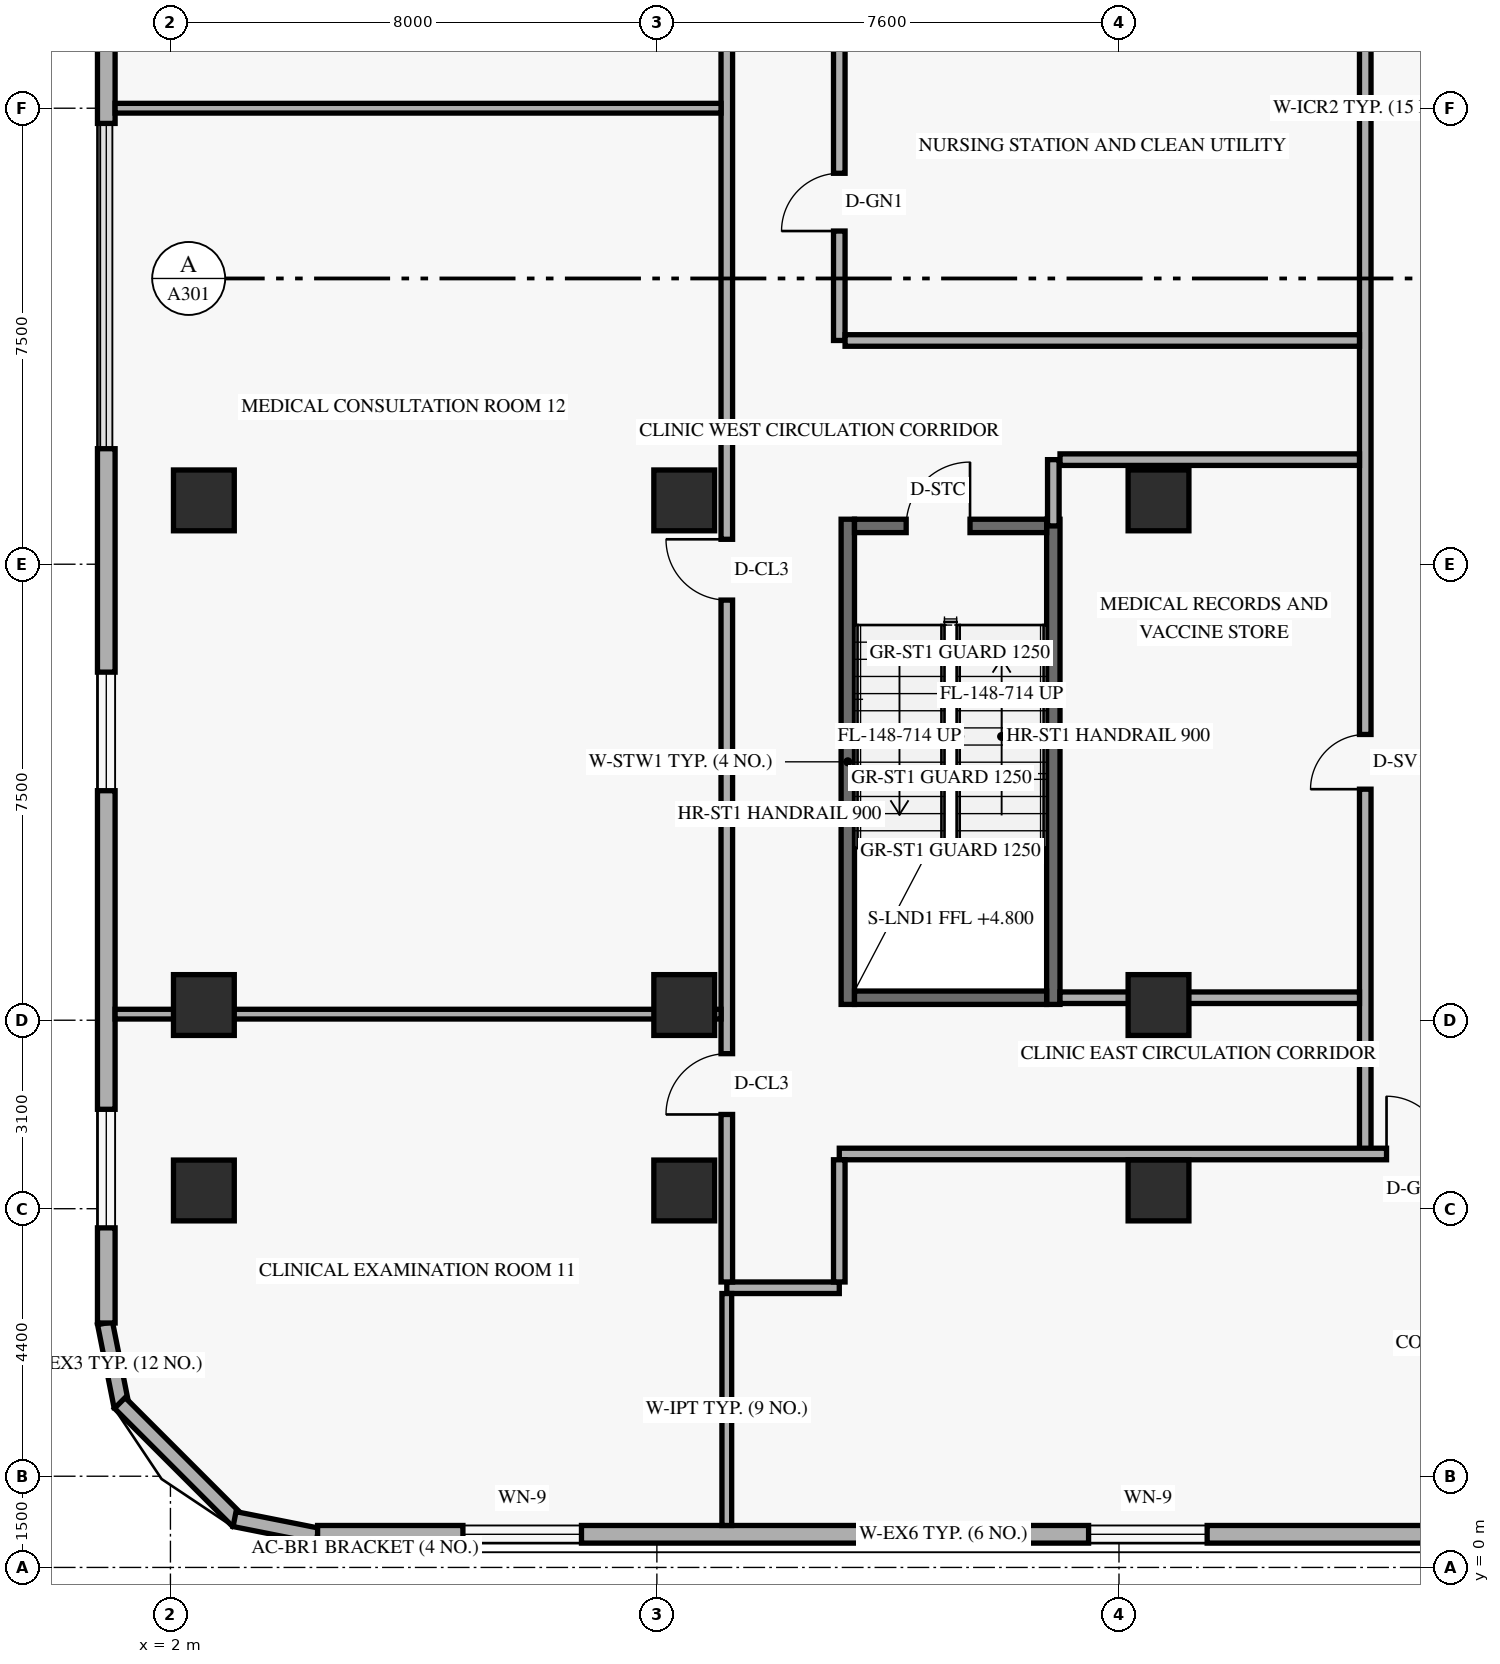
"""IFC4 building model, lengths in metres.
Left out: names, types, materials, properties, quantities, classifications, styles, units other than length and angle.
Written with IfcOpenShell. Run it as: python <this file> out.ifc"""

import sys

from ifc_helpers import new_model, si_unit, direction, frame, frame_2d, origin, origin_2d, place, context, subcontext, project, spatial, rectangle, extrude, element, fill, save


model = new_model("IFC4")
c1 = context("Model", 3, precision=1e-05, world=origin(), true_north=direction((0.0, 1.0)))
c2 = subcontext(c1, "Body", "Model", "MODEL_VIEW")
j1 = project(units=[si_unit("LENGTHUNIT", "METRE"), si_unit("PLANEANGLEUNIT", "RADIAN")], contexts=[c1])
p1 = place(None, origin())
s1 = spatial("IfcSite", under=j1, at=p1, CompositionType="ELEMENT")
p2 = place(p1, origin())
s2 = spatial("IfcBuilding", under=s1, at=p2, CompositionType="ELEMENT")
p3 = place(p2, frame((0.0, 0.0, 4.8)))
s3 = spatial("IfcBuildingStorey", under=s2, at=p3, CompositionType="ELEMENT", Elevation=4.8)
for number, where, z_axis, x_axis in (
    (1, (13.14, 9.26, 0.0), (0.0, 0.0, 1.0), (0.0, 1.0, 0.0)),
    (2, (16.52, 9.26, 0.0), (0.0, 0.0, 1.0), (0.0, 1.0, 0.0)),
):
    element("IfcWall", number, at=place(p3, frame(where, z_axis=z_axis, x_axis=x_axis)), inside=s3, PredefinedType="SHEAR", context=c2, shape_type="SweptSolid", body=[
        extrude(rectangle(XDim=7.98, YDim=0.22, at=frame_2d((3.99, 0.0))), origin(), (0.0, 0.0, 1.0), 4.52),
    ])
p4 = place(p3, frame((13.25, 9.37, 0.0), z_axis=(0.0, 0.0, 1.0), x_axis=(1.0, 0.0, 0.0)))
e3 = element("IfcWall", 3, at=p4, inside=s3, PredefinedType="SHEAR", context=c2, shape_type="SweptSolid", body=[
    extrude(rectangle(XDim=3.16, YDim=0.22, at=frame_2d((1.58, 0.0))), origin(), (0.0, 0.0, 1.0), 4.52),
])
p5 = place(p3, frame((13.25, 17.13, 0.0), z_axis=(0.0, 0.0, 1.0), x_axis=(1.0, 0.0, 0.0)))
e4 = element("IfcWall", 4, at=p5, inside=s3, PredefinedType="SHEAR", context=c2, shape_type="SweptSolid", body=[
    extrude(rectangle(XDim=3.16, YDim=0.22, at=frame_2d((1.58, 0.0))), origin(), (0.0, 0.0, 1.0), 4.52),
])
p6 = place(p5, frame((0.85, 0.0, 0.0)))
e5 = element("IfcOpeningElement", 5, at=p6, cuts=e4, PredefinedType="OPENING", context=c2, shape_type="SweptSolid", body=[
    extrude(rectangle(XDim=1.05, YDim=2.15, at=frame_2d((0.525, 1.075))), frame((0.0, 0.12, 0.0), z_axis=(0.0, -1.0, 0.0), x_axis=(1.0, 0.0, 0.0)), (0.0, 0.0, 1.0), 0.24),
])
for number, where, z_axis, x_axis in (
    (6, (2.55, 6.2, 0.0), (0.0, 0.0, 1.0), (1.0, 0.0, 0.0)),
    (7, (2.55, 9.25, 0.0), (0.0, 0.0, 1.0), (1.0, 0.0, 0.0)),
    (8, (2.55, 17.55, 0.0), (0.0, 0.0, 1.0), (1.0, 0.0, 0.0)),
    (9, (10.45, 6.2, 0.0), (0.0, 0.0, 1.0), (1.0, 0.0, 0.0)),
    (10, (10.45, 9.25, 0.0), (0.0, 0.0, 1.0), (1.0, 0.0, 0.0)),
    (11, (10.45, 17.55, 0.0), (0.0, 0.0, 1.0), (1.0, 0.0, 0.0)),
    (12, (18.25, 6.2, 0.0), (0.0, 0.0, 1.0), (1.0, 0.0, 0.0)),
    (13, (18.25, 9.25, 0.0), (0.0, 0.0, 1.0), (1.0, 0.0, 0.0)),
    (14, (18.25, 17.55, 0.0), (0.0, 0.0, 1.0), (1.0, 0.0, 0.0)),
):
    element("IfcColumn", number, at=place(p3, frame(where, z_axis=z_axis, x_axis=x_axis)), inside=s3, PredefinedType="COLUMN", context=c2, shape_type="SweptSolid", body=[
        extrude(rectangle(XDim=1.0, YDim=1.0, at=origin_2d()), origin(), (0.0, 0.0, 1.0), 4.8),
    ])
p7 = place(p3, frame((0.924, 4.017, 0.0), z_axis=(0.0, 0.0, 1.0), x_axis=(0.19496651342, -0.980809899341, 0.0)))
e15 = element("IfcWall", 15, at=p7, inside=s3, PredefinedType="SOLIDWALL", context=c2, shape_type="SweptSolid", body=[
    extrude(rectangle(XDim=1.389, YDim=0.25, at=frame_2d((0.694, 0.0))), origin(), (0.0, 0.0, 1.0), 4.52),
])
p8 = place(p3, frame((1.168, 2.705, 0.0), z_axis=(0.0, 0.0, 1.0), x_axis=(0.707106781187, -0.707106781187, 0.0)))
e16 = element("IfcWall", 16, at=p8, inside=s3, PredefinedType="SOLIDWALL", context=c2, shape_type="SweptSolid", body=[
    extrude(rectangle(XDim=2.739, YDim=0.25, at=frame_2d((1.37, 0.0))), origin(), (0.0, 0.0, 1.0), 4.52),
])
p9 = place(p3, frame((3.054, 0.795, 0.0), z_axis=(0.0, 0.0, 1.0), x_axis=(0.980809899341, -0.19496651342, 0.0)))
e17 = element("IfcWall", 17, at=p9, inside=s3, PredefinedType="SOLIDWALL", context=c2, shape_type="SweptSolid", body=[
    extrude(rectangle(XDim=1.389, YDim=0.25, at=frame_2d((0.694, 0.0))), origin(), (0.0, 0.0, 1.0), 4.52),
])
p10 = place(p3, frame((4.42, 0.545, 0.0), z_axis=(0.0, 0.0, 1.0), x_axis=(1.0, 0.0, 0.0)))
e18 = element("IfcWall", 18, at=p10, inside=s3, PredefinedType="SOLIDWALL", context=c2, shape_type="SweptSolid", body=[
    extrude(rectangle(XDim=20.58, YDim=0.29, at=frame_2d((10.29, 0.0))), origin(), (0.0, 0.0, 1.0), 4.52),
])
p11 = place(p10, frame((2.39, 0.0, 0.85)))
e19 = element("IfcOpeningElement", 19, at=p11, cuts=e18, PredefinedType="OPENING", context=c2, shape_type="SweptSolid", body=[
    extrude(rectangle(XDim=1.95, YDim=1.75, at=frame_2d((0.975, 0.875))), frame((0.0, 0.155, 0.0), z_axis=(0.0, -1.0, 0.0), x_axis=(1.0, 0.0, 0.0)), (0.0, 0.0, 1.0), 0.31),
])
p12 = place(p10, frame((12.68, 0.0, 0.85)))
e20 = element("IfcOpeningElement", 20, at=p12, cuts=e18, PredefinedType="OPENING", context=c2, shape_type="SweptSolid", body=[
    extrude(rectangle(XDim=1.95, YDim=1.75, at=frame_2d((0.975, 0.875))), frame((0.0, 0.155, 0.0), z_axis=(0.0, -1.0, 0.0), x_axis=(1.0, 0.0, 0.0)), (0.0, 0.0, 1.0), 0.31),
])
p13 = place(p3, frame((0.945, 43.98, 0.0), z_axis=(0.0, 0.0, 1.0), x_axis=(0.0, -1.0, 0.0)))
e21 = element("IfcWall", 21, at=p13, inside=s3, PredefinedType="SOLIDWALL", context=c2, shape_type="SweptSolid", body=[
    extrude(rectangle(XDim=20.23, YDim=0.29, at=frame_2d((10.115, 0.0))), origin(), (0.0, 0.0, 1.0), 4.52),
])
p14 = place(p13, frame((11.68, 0.0, 0.85)))
e22 = element("IfcOpeningElement", 22, at=p14, cuts=e21, PredefinedType="OPENING", context=c2, shape_type="SweptSolid", body=[
    extrude(rectangle(XDim=1.95, YDim=1.75, at=frame_2d((0.975, 0.875))), frame((0.0, 0.155, 0.0), z_axis=(0.0, -1.0, 0.0), x_axis=(1.0, 0.0, 0.0)), (0.0, 0.0, 1.0), 0.31),
])
p15 = place(p13, frame((1.565, 0.0, 0.85)))
e23 = element("IfcOpeningElement", 23, at=p15, cuts=e21, PredefinedType="OPENING", context=c2, shape_type="SweptSolid", body=[
    extrude(rectangle(XDim=1.95, YDim=1.75, at=frame_2d((0.975, 0.875))), frame((0.0, 0.155, 0.0), z_axis=(0.0, -1.0, 0.0), x_axis=(1.0, 0.0, 0.0)), (0.0, 0.0, 1.0), 0.31),
])
p16 = place(p3, frame((0.945, 18.4, 0.0), z_axis=(0.0, 0.0, 1.0), x_axis=(0.0, -1.0, 0.0)))
e24 = element("IfcWall", 24, at=p16, inside=s3, PredefinedType="SOLIDWALL", context=c2, shape_type="SweptSolid", body=[
    extrude(rectangle(XDim=14.38, YDim=0.29, at=frame_2d((7.19, 0.0))), origin(), (0.0, 0.0, 1.0), 4.52),
])
p17 = place(p16, frame((10.865, 0.0, 0.85)))
e25 = element("IfcOpeningElement", 25, at=p17, cuts=e24, PredefinedType="OPENING", context=c2, shape_type="SweptSolid", body=[
    extrude(rectangle(XDim=1.95, YDim=1.75, at=frame_2d((0.975, 0.875))), frame((0.0, 0.155, 0.0), z_axis=(0.0, -1.0, 0.0), x_axis=(1.0, 0.0, 0.0)), (0.0, 0.0, 1.0), 0.31),
])
p18 = place(p16, frame((3.675, 0.0, 0.85)))
e26 = element("IfcOpeningElement", 26, at=p18, cuts=e24, PredefinedType="OPENING", context=c2, shape_type="SweptSolid", body=[
    extrude(rectangle(XDim=1.95, YDim=1.75, at=frame_2d((0.975, 0.875))), frame((0.0, 0.155, 0.0), z_axis=(0.0, -1.0, 0.0), x_axis=(1.0, 0.0, 0.0)), (0.0, 0.0, 1.0), 0.31),
])
p19 = place(p3, frame((21.65, 6.8, 0.0), z_axis=(0.0, 0.0, 1.0), x_axis=(0.0, 1.0, 0.0)))
e27 = element("IfcWall", 27, at=p19, inside=s3, PredefinedType="STANDARD", context=c2, shape_type="SweptSolid", body=[
    extrude(rectangle(XDim=34.4, YDim=0.19, at=frame_2d((17.2, 0.0))), origin(), (0.0, 0.0, 1.0), 3.502),
])
p20 = place(p19, frame((20.2, 0.0, 0.0)))
e28 = element("IfcOpeningElement", 28, at=p20, cuts=e27, PredefinedType="OPENING", context=c2, shape_type="SweptSolid", body=[
    extrude(rectangle(XDim=0.92, YDim=2.14, at=frame_2d((0.46, 1.07))), frame((0.0, 0.105, 0.0), z_axis=(0.0, -1.0, 0.0), x_axis=(1.0, 0.0, 0.0)), (0.0, 0.0, 1.0), 0.21),
])
p21 = place(p19, frame((28.2, 0.0, 0.0)))
e29 = element("IfcOpeningElement", 29, at=p21, cuts=e27, PredefinedType="OPENING", context=c2, shape_type="SweptSolid", body=[
    extrude(rectangle(XDim=0.95, YDim=2.15, at=frame_2d((0.475, 1.075))), frame((0.0, 0.105, 0.0), z_axis=(0.0, -1.0, 0.0), x_axis=(1.0, 0.0, 0.0)), (0.0, 0.0, 1.0), 0.21),
])
p22 = place(p19, frame((6.0, 0.0, 0.0)))
e30 = element("IfcOpeningElement", 30, at=p22, cuts=e27, PredefinedType="OPENING", context=c2, shape_type="SweptSolid", body=[
    extrude(rectangle(XDim=0.9, YDim=2.1, at=frame_2d((0.45, 1.05))), frame((0.0, 0.105, 0.0), z_axis=(0.0, -1.0, 0.0), x_axis=(1.0, 0.0, 0.0)), (0.0, 0.0, 1.0), 0.21),
])
p23 = place(p3, frame((13.0, 6.8, 0.0), z_axis=(0.0, 0.0, 1.0), x_axis=(1.0, 0.0, 0.0)))
e31 = element("IfcWall", 31, at=p23, inside=s3, PredefinedType="STANDARD", context=c2, shape_type="SweptSolid", body=[
    extrude(rectangle(XDim=24.455, YDim=0.19, at=frame_2d((12.228, 0.0))), origin(), (0.0, 0.0, 1.0), 3.732),
])
p24 = place(p23, frame((9.0, 0.0, 0.0)))
e32 = element("IfcOpeningElement", 32, at=p24, cuts=e31, PredefinedType="OPENING", context=c2, shape_type="SweptSolid", body=[
    extrude(rectangle(XDim=0.95, YDim=2.15, at=frame_2d((0.475, 1.075))), frame((0.0, 0.105, 0.0), z_axis=(0.0, -1.0, 0.0), x_axis=(1.0, 0.0, 0.0)), (0.0, 0.0, 1.0), 0.21),
])
p25 = place(p3, frame((11.15, 4.6, 0.0), z_axis=(0.0, 0.0, 1.0), x_axis=(1.0, 0.0, 0.0)))
e33 = element("IfcWall", 33, at=p25, inside=s3, PredefinedType="STANDARD", context=c2, shape_type="SweptSolid", body=[
    extrude(rectangle(XDim=1.85, YDim=0.19, at=frame_2d((0.925, 0.0))), origin(), (0.0, 0.0, 1.0), 4.52),
])
p26 = place(p3, frame((13.0, 4.695, 0.0), z_axis=(0.0, 0.0, 1.0), x_axis=(0.0, 1.0, 0.0)))
e34 = element("IfcWall", 34, at=p26, inside=s3, PredefinedType="STANDARD", context=c2, shape_type="SweptSolid", body=[
    extrude(rectangle(XDim=2.01, YDim=0.19, at=frame_2d((1.005, 0.0))), origin(), (0.0, 0.0, 1.0), 3.969),
])
p27 = place(p3, frame((16.63, 9.37, 0.0), z_axis=(0.0, 0.0, 1.0), x_axis=(1.0, 0.0, 0.0)))
e35 = element("IfcWall", 35, at=p27, inside=s3, PredefinedType="STANDARD", context=c2, shape_type="SweptSolid", body=[
    extrude(rectangle(XDim=4.925, YDim=0.19, at=frame_2d((2.462, 0.0))), origin(), (0.0, 0.0, 1.0), 3.502),
])
p28 = place(p3, frame((11.15, 4.695, 0.0), z_axis=(0.0, 0.0, 1.0), x_axis=(0.0, 1.0, 0.0)))
e36 = element("IfcWall", 36, at=p28, inside=s3, PredefinedType="STANDARD", context=c2, shape_type="SweptSolid", body=[
    extrude(rectangle(XDim=38.61, YDim=0.19, at=frame_2d((19.305, 0.0))), origin(), (0.0, 0.0, 1.0), 3.502),
])
p29 = place(p28, frame((2.755, 0.0, 0.0)))
e37 = element("IfcOpeningElement", 37, at=p29, cuts=e36, PredefinedType="OPENING", context=c2, shape_type="SweptSolid", body=[
    extrude(rectangle(XDim=1.0, YDim=2.15, at=frame_2d((0.5, 1.075))), frame((0.0, 0.105, 0.0), z_axis=(0.0, -1.0, 0.0), x_axis=(1.0, 0.0, 0.0)), (0.0, 0.0, 1.0), 0.21),
])
p30 = place(p28, frame((11.215, 0.0, 0.0)))
e38 = element("IfcOpeningElement", 38, at=p30, cuts=e36, PredefinedType="OPENING", context=c2, shape_type="SweptSolid", body=[
    extrude(rectangle(XDim=1.0, YDim=2.15, at=frame_2d((0.5, 1.075))), frame((0.0, 0.105, 0.0), z_axis=(0.0, -1.0, 0.0), x_axis=(1.0, 0.0, 0.0)), (0.0, 0.0, 1.0), 0.21),
])
p31 = place(p28, frame((26.255, 0.0, 0.0)))
e39 = element("IfcOpeningElement", 39, at=p31, cuts=e36, PredefinedType="OPENING", context=c2, shape_type="SweptSolid", body=[
    extrude(rectangle(XDim=1.0, YDim=2.15, at=frame_2d((0.5, 1.075))), frame((0.0, 0.105, 0.0), z_axis=(0.0, -1.0, 0.0), x_axis=(1.0, 0.0, 0.0)), (0.0, 0.0, 1.0), 0.21),
])
p32 = place(p28, frame((34.805, 0.0, 0.0)))
e40 = element("IfcOpeningElement", 40, at=p32, cuts=e36, PredefinedType="OPENING", context=c2, shape_type="SweptSolid", body=[
    extrude(rectangle(XDim=1.0, YDim=2.15, at=frame_2d((0.5, 1.075))), frame((0.0, 0.105, 0.0), z_axis=(0.0, -1.0, 0.0), x_axis=(1.0, 0.0, 0.0)), (0.0, 0.0, 1.0), 0.21),
])
p33 = place(p3, frame((13.0, 20.18, 0.0), z_axis=(0.0, 0.0, 1.0), x_axis=(0.0, 1.0, 0.0)))
e41 = element("IfcWall", 41, at=p33, inside=s3, PredefinedType="STANDARD", context=c2, shape_type="SweptSolid", body=[
    extrude(rectangle(XDim=19.075, YDim=0.19, at=frame_2d((9.538, 0.0))), origin(), (0.0, 0.0, 1.0), 3.502),
])
p34 = place(p33, frame((1.8, 0.0, 0.0)))
e42 = element("IfcOpeningElement", 42, at=p34, cuts=e41, PredefinedType="OPENING", context=c2, shape_type="SweptSolid", body=[
    extrude(rectangle(XDim=0.95, YDim=2.15, at=frame_2d((0.475, 1.075))), frame((0.0, 0.105, 0.0), z_axis=(0.0, -1.0, 0.0), x_axis=(1.0, 0.0, 0.0)), (0.0, 0.0, 1.0), 0.21),
])
p35 = place(p33, frame((6.82, 0.0, 0.0)))
e43 = element("IfcOpeningElement", 43, at=p35, cuts=e41, PredefinedType="OPENING", context=c2, shape_type="SweptSolid", body=[
    extrude(rectangle(XDim=0.95, YDim=2.14, at=frame_2d((0.475, 1.07))), frame((0.0, 0.105, 0.0), z_axis=(0.0, -1.0, 0.0), x_axis=(1.0, 0.0, 0.0)), (0.0, 0.0, 1.0), 0.21),
])
p36 = place(p3, frame((16.63, 18.22, 0.0), z_axis=(0.0, 0.0, 1.0), x_axis=(1.0, 0.0, 0.0)))
e44 = element("IfcWall", 44, at=p36, inside=s3, PredefinedType="STANDARD", context=c2, shape_type="SweptSolid", body=[
    extrude(rectangle(XDim=4.925, YDim=0.19, at=frame_2d((2.462, 0.0))), origin(), (0.0, 0.0, 1.0), 3.732),
])
p37 = place(p3, frame((16.52, 17.13, 0.0), z_axis=(0.0, 0.0, 1.0), x_axis=(0.0, 1.0, 0.0)))
e45 = element("IfcWall", 45, at=p37, inside=s3, PredefinedType="STANDARD", context=c2, shape_type="SweptSolid", body=[
    extrude(rectangle(XDim=1.09, YDim=0.19, at=frame_2d((0.545, 0.0))), origin(), (0.0, 0.0, 1.0), 3.502),
])
p38 = place(p3, frame((13.095, 20.18, 0.0), z_axis=(0.0, 0.0, 1.0), x_axis=(1.0, 0.0, 0.0)))
e46 = element("IfcWall", 46, at=p38, inside=s3, PredefinedType="STANDARD", context=c2, shape_type="SweptSolid", body=[
    extrude(rectangle(XDim=8.46, YDim=0.19, at=frame_2d((4.23, 0.0))), origin(), (0.0, 0.0, 1.0), 3.732),
])
p39 = place(p3, frame((11.15, 0.69, 0.0), z_axis=(0.0, 0.0, 1.0), x_axis=(0.0, 1.0, 0.0)))
e47 = element("IfcWall", 47, at=p39, inside=s3, PredefinedType="PARTITIONING", context=c2, shape_type="SweptSolid", body=[
    extrude(rectangle(XDim=3.815, YDim=0.16, at=frame_2d((1.907, 0.0))), origin(), (0.0, 0.0, 1.0), 4.52),
])
p40 = place(p3, frame((1.09, 9.1, 0.0), z_axis=(0.0, 0.0, 1.0), x_axis=(1.0, 0.0, 0.0)))
e48 = element("IfcWall", 48, at=p40, inside=s3, PredefinedType="PARTITIONING", context=c2, shape_type="SweptSolid", body=[
    extrude(rectangle(XDim=9.965, YDim=0.16, at=frame_2d((4.982, 0.0))), origin(), (0.0, 0.0, 1.0), 3.502),
])
p41 = place(p3, frame((1.09, 24.0, 0.0), z_axis=(0.0, 0.0, 1.0), x_axis=(1.0, 0.0, 0.0)))
e49 = element("IfcWall", 49, at=p41, inside=s3, PredefinedType="PARTITIONING", context=c2, shape_type="SweptSolid", body=[
    extrude(rectangle(XDim=9.965, YDim=0.16, at=frame_2d((4.982, 0.0))), origin(), (0.0, 0.0, 1.0), 3.732),
])
p42 = place(p11, origin())
e50 = element("IfcWindow", 50, at=p42, inside=s3, PartitioningType="SINGLE_PANEL", PredefinedType="WINDOW", context=c2, shape_type="SweptSolid", body=[
    extrude(rectangle(XDim=1.95, YDim=1.75, at=frame_2d((0.975, 0.875))), frame((0.0, 0.03, 0.0), z_axis=(0.0, -1.0, 0.0), x_axis=(1.0, 0.0, 0.0)), (0.0, 0.0, 1.0), 0.06),
])
fill(e19, e50)
p43 = place(p12, origin())
e51 = element("IfcWindow", 51, at=p43, inside=s3, PartitioningType="SINGLE_PANEL", PredefinedType="WINDOW", context=c2, shape_type="SweptSolid", body=[
    extrude(rectangle(XDim=1.95, YDim=1.75, at=frame_2d((0.975, 0.875))), frame((0.0, 0.03, 0.0), z_axis=(0.0, -1.0, 0.0), x_axis=(1.0, 0.0, 0.0)), (0.0, 0.0, 1.0), 0.06),
])
fill(e20, e51)
p44 = place(p17, origin())
e52 = element("IfcWindow", 52, at=p44, inside=s3, PartitioningType="SINGLE_PANEL", PredefinedType="WINDOW", context=c2, shape_type="SweptSolid", body=[
    extrude(rectangle(XDim=1.95, YDim=1.75, at=frame_2d((0.975, 0.875))), frame((0.0, 0.03, 0.0), z_axis=(0.0, -1.0, 0.0), x_axis=(1.0, 0.0, 0.0)), (0.0, 0.0, 1.0), 0.06),
])
fill(e25, e52)
p45 = place(p18, origin())
e53 = element("IfcWindow", 53, at=p45, inside=s3, PartitioningType="SINGLE_PANEL", PredefinedType="WINDOW", context=c2, shape_type="SweptSolid", body=[
    extrude(rectangle(XDim=1.95, YDim=1.75, at=frame_2d((0.975, 0.875))), frame((0.0, 0.03, 0.0), z_axis=(0.0, -1.0, 0.0), x_axis=(1.0, 0.0, 0.0)), (0.0, 0.0, 1.0), 0.06),
])
fill(e26, e53)
p46 = place(p6, frame((1.05, 0.0, 0.0), z_axis=(0.0, 0.0, 1.0), x_axis=(-1.0, 0.0, 0.0)))
e54 = element("IfcDoor", 54, at=p46, inside=s3, OperationType="SINGLE_SWING_LEFT", PredefinedType="DOOR", context=c2, shape_type="SweptSolid", body=[
    extrude(rectangle(XDim=1.05, YDim=2.15, at=frame_2d((0.525, 1.075))), frame((0.0, 0.025, 0.0), z_axis=(0.0, -1.0, 0.0), x_axis=(1.0, 0.0, 0.0)), (0.0, 0.0, 1.0), 0.05),
])
fill(e5, e54)
p47 = place(p29, origin())
e55 = element("IfcDoor", 55, at=p47, inside=s3, OperationType="SINGLE_SWING_LEFT", PredefinedType="DOOR", context=c2, shape_type="SweptSolid", body=[
    extrude(rectangle(XDim=1.0, YDim=2.15, at=frame_2d((0.5, 1.075))), frame((0.0, 0.025, 0.0), z_axis=(0.0, -1.0, 0.0), x_axis=(1.0, 0.0, 0.0)), (0.0, 0.0, 1.0), 0.05),
])
fill(e37, e55)
p48 = place(p30, origin())
e56 = element("IfcDoor", 56, at=p48, inside=s3, OperationType="SINGLE_SWING_RIGHT", PredefinedType="DOOR", context=c2, shape_type="SweptSolid", body=[
    extrude(rectangle(XDim=1.0, YDim=2.15, at=frame_2d((0.5, 1.075))), frame((0.0, 0.025, 0.0), z_axis=(0.0, -1.0, 0.0), x_axis=(1.0, 0.0, 0.0)), (0.0, 0.0, 1.0), 0.05),
])
fill(e38, e56)
p49 = place(p34, origin())
e57 = element("IfcDoor", 57, at=p49, inside=s3, OperationType="SINGLE_SWING_LEFT", PredefinedType="DOOR", context=c2, shape_type="SweptSolid", body=[
    extrude(rectangle(XDim=0.95, YDim=2.15, at=frame_2d((0.475, 1.075))), frame((0.0, 0.025, 0.0), z_axis=(0.0, -1.0, 0.0), x_axis=(1.0, 0.0, 0.0)), (0.0, 0.0, 1.0), 0.05),
])
fill(e42, e57)
p50 = place(p22, origin())
e58 = element("IfcDoor", 58, at=p50, inside=s3, OperationType="SINGLE_SWING_LEFT", PredefinedType="DOOR", context=c2, shape_type="SweptSolid", body=[
    extrude(rectangle(XDim=0.9, YDim=2.1, at=frame_2d((0.45, 1.05))), frame((0.0, 0.025, 0.0), z_axis=(0.0, -1.0, 0.0), x_axis=(1.0, 0.0, 0.0)), (0.0, 0.0, 1.0), 0.05),
])
fill(e30, e58)
p51 = place(p24, origin())
e59 = element("IfcDoor", 59, at=p51, inside=s3, OperationType="SINGLE_SWING_LEFT", PredefinedType="DOOR", context=c2, shape_type="SweptSolid", body=[
    extrude(rectangle(XDim=0.95, YDim=2.15, at=frame_2d((0.475, 1.075))), frame((0.0, 0.025, 0.0), z_axis=(0.0, -1.0, 0.0), x_axis=(1.0, 0.0, 0.0)), (0.0, 0.0, 1.0), 0.05),
])
fill(e32, e59)
save(model, sys.argv[1])
